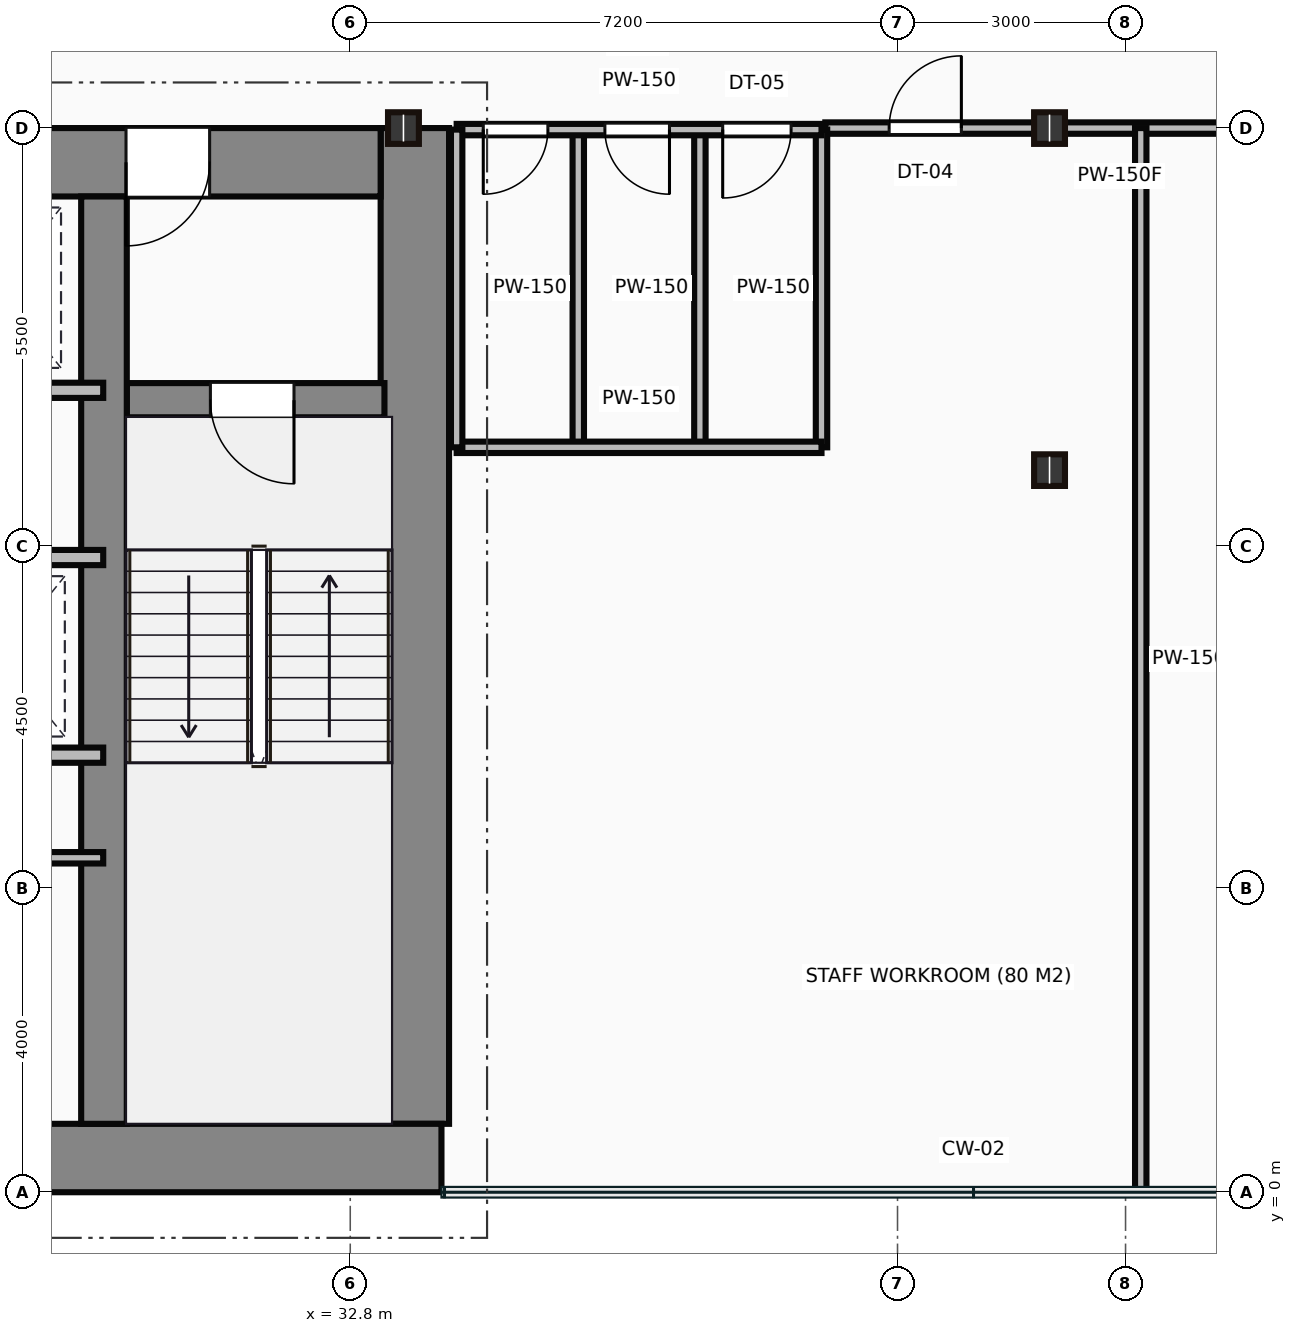
"""IFC4 building model, lengths in metres.
Left out: names, types, materials, properties, quantities, classifications, styles, units other than length and angle.
Written with IfcOpenShell. Run it as: python <this file> out.ifc"""

import sys

from ifc_helpers import new_model, si_unit, direction, frame, frame_2d, origin, origin_2d, place, context, subcontext, project, spatial, rectangle, i_section, extrude, source, transform, mapped, element, fill, save


model = new_model("IFC4")
c1 = context("Model", 3, precision=1e-05, world=origin(), true_north=direction((0.0, 1.0)))
c2 = subcontext(c1, "Body", "Model", "MODEL_VIEW")
j1 = project(units=[si_unit("LENGTHUNIT", "METRE"), si_unit("PLANEANGLEUNIT", "RADIAN")], contexts=[c1])
p1 = place(None, origin())
s1 = spatial("IfcSite", under=j1, at=p1, CompositionType="ELEMENT")
p2 = place(p1, origin())
s2 = spatial("IfcBuilding", under=s1, at=p2, CompositionType="ELEMENT")
p3 = place(p2, frame((0.0, 0.0, 58.05)))
s3 = spatial("IfcBuildingStorey", under=s2, at=p3, CompositionType="ELEMENT", Elevation=58.05)
m1 = source(origin(), c2, "Body", "SweptSolid", [
    extrude(rectangle(XDim=29.5, YDim=0.9, at=frame_2d((14.75, 0.0))), origin(), (0.0, 0.0, 1.0), 3.65),
])
p4 = place(p3, frame((4.5, 0.45, 0.0), z_axis=(0.0, 0.0, 1.0), x_axis=(1.0, 0.0, 0.0)))
e1 = element("IfcWall", 1, at=p4, inside=s3, PredefinedType="SHEAR", context=c2, shape_type="MappedRepresentation", body=[
    mapped(m1, transform((0.0, 0.0, 0.0))),
])
m2 = source(origin(), c2, "Body", "SweptSolid", [
    extrude(rectangle(XDim=13.1, YDim=0.9, at=frame_2d((6.55, 0.0))), origin(), (0.0, 0.0, 1.0), 3.65),
])
p5 = place(p3, frame((33.65, 0.9, 0.0), z_axis=(0.0, 0.0, 1.0), x_axis=(0.0, 1.0, 0.0)))
e2 = element("IfcWall", 2, at=p5, inside=s3, PredefinedType="SHEAR", context=c2, shape_type="MappedRepresentation", body=[
    mapped(m2, transform((0.0, 0.0, 0.0))),
])
m3 = source(origin(), c2, "Body", "SweptSolid", [
    extrude(rectangle(XDim=12.6, YDim=0.9, at=frame_2d((6.3, 0.0))), origin(), (0.0, 0.0, 1.0), 3.65),
])
p6 = place(p3, frame((20.6, 13.55, 0.0), z_axis=(0.0, 0.0, 1.0), x_axis=(1.0, 0.0, 0.0)))
e3 = element("IfcWall", 3, at=p6, inside=s3, PredefinedType="SHEAR", context=c2, shape_type="MappedRepresentation", body=[
    mapped(m3, transform((0.0, 0.0, 0.0))),
])
p7 = place(p6, frame((9.25, 0.0, 0.0)))
e4 = element("IfcOpeningElement", 4, at=p7, cuts=e3, PredefinedType="OPENING", context=c2, shape_type="SweptSolid", body=[
    extrude(rectangle(XDim=1.1, YDim=2.15, at=frame_2d((0.55, 1.075))), frame((0.0, 0.46, 0.0), z_axis=(0.0, -1.0, 0.0), x_axis=(1.0, 0.0, 0.0)), (0.0, 0.0, 1.0), 0.92),
])
m4 = source(origin(), c2, "Body", "SweptSolid", [
    extrude(rectangle(XDim=12.2, YDim=0.6, at=frame_2d((6.1, 0.0))), origin(), (0.0, 0.0, 1.0), 3.65),
])
p8 = place(p3, frame((29.56, 0.9, 0.0), z_axis=(0.0, 0.0, 1.0), x_axis=(0.0, 1.0, 0.0)))
e5 = element("IfcWall", 5, at=p8, inside=s3, PredefinedType="SHEAR", context=c2, shape_type="MappedRepresentation", body=[
    mapped(m4, transform((0.0, 0.0, 0.0))),
])
m5 = source(origin(), c2, "Body", "SweptSolid", [
    extrude(rectangle(XDim=3.39, YDim=0.45, at=frame_2d((1.695, 0.0))), origin(), (0.0, 0.0, 1.0), 3.65),
])
p9 = place(p3, frame((29.86, 10.42, 0.0), z_axis=(0.0, 0.0, 1.0), x_axis=(1.0, 0.0, 0.0)))
e6 = element("IfcWall", 6, at=p9, inside=s3, PredefinedType="SHEAR", context=c2, shape_type="MappedRepresentation", body=[
    mapped(m5, transform((0.0, 0.0, 0.0))),
])
p10 = place(p9, frame((1.1, 0.0, 0.0)))
e7 = element("IfcOpeningElement", 7, at=p10, cuts=e6, PredefinedType="OPENING", context=c2, shape_type="SweptSolid", body=[
    extrude(rectangle(XDim=1.1, YDim=2.15, at=frame_2d((0.55, 1.075))), frame((0.0, 0.235, 0.0), z_axis=(0.0, -1.0, 0.0), x_axis=(1.0, 0.0, 0.0)), (0.0, 0.0, 1.0), 0.47),
])
m6 = source(origin(), c2, "Body", "SweptSolid", [
    extrude(i_section(OverallWidth=0.406, OverallDepth=0.416, WebThickness=0.03, FlangeThickness=0.048, at=origin_2d()), origin(), (0.0, 0.0, 1.0), 3.65),
])
for number, where, z_axis, x_axis in (
    (8, (33.5, 14.0, 0.0), (0.0, 0.0, 1.0), (1.0, 0.0, 0.0)),
    (9, (42.0, 9.5, 0.0), (0.0, 0.0, 1.0), (1.0, 0.0, 0.0)),
    (10, (42.0, 14.0, 0.0), (0.0, 0.0, 1.0), (1.0, 0.0, 0.0)),
):
    element("IfcColumn", number, at=place(p3, frame(where, z_axis=z_axis, x_axis=x_axis)), inside=s3, PredefinedType="COLUMN", context=c2, shape_type="MappedRepresentation", body=[
        mapped(m6, transform((0.0, 0.0, 0.0))),
    ])
m7 = source(origin(), c2, "Body", "SweptSolid", [
    extrude(rectangle(XDim=8.8, YDim=0.2, at=frame_2d((4.4, 0.0))), origin(), (0.0, 0.0, 1.0), 3.4),
])
p11 = place(p3, frame((20.75, 10.55, 0.0), z_axis=(0.0, 0.0, 1.0), x_axis=(1.0, 0.0, 0.0)))
e11 = element("IfcWall", 11, at=p11, inside=s3, PredefinedType="PARTITIONING", context=c2, shape_type="MappedRepresentation", body=[
    mapped(m7, transform((0.0, 0.0, 0.0))),
])
m8 = source(origin(), c2, "Body", "SweptSolid", [
    extrude(rectangle(XDim=4.55, YDim=0.2, at=frame_2d((2.275, 0.0))), origin(), (0.0, 0.0, 1.0), 3.4),
])
for number, where, z_axis, x_axis in (
    (12, (25.0, 8.35, 0.0), (0.0, 0.0, 1.0), (1.0, 0.0, 0.0)),
    (13, (25.0, 5.75, 0.0), (0.0, 0.0, 1.0), (1.0, 0.0, 0.0)),
):
    element("IfcWall", number, at=place(p3, frame(where, z_axis=z_axis, x_axis=x_axis)), inside=s3, PredefinedType="PARTITIONING", context=c2, shape_type="MappedRepresentation", body=[
        mapped(m8, transform((0.0, 0.0, 0.0))),
    ])
m9 = source(origin(), c2, "Body", "SweptSolid", [
    extrude(rectangle(XDim=4.55, YDim=0.15, at=frame_2d((2.275, 0.0))), origin(), (0.0, 0.0, 1.0), 3.4),
])
p12 = place(p3, frame((25.0, 4.4, 0.0), z_axis=(0.0, 0.0, 1.0), x_axis=(1.0, 0.0, 0.0)))
e14 = element("IfcWall", 14, at=p12, inside=s3, PredefinedType="PARTITIONING", context=c2, shape_type="MappedRepresentation", body=[
    mapped(m9, transform((0.0, 0.0, 0.0))),
])
m10 = source(origin(), c2, "Body", "SweptSolid", [
    extrude(rectangle(XDim=4.8, YDim=0.15, at=frame_2d((2.4, 0.0))), origin(), (0.0, 0.0, 1.0), 2.625),
])
p13 = place(p3, frame((34.2, 13.98, 0.0), z_axis=(0.0, 0.0, 1.0), x_axis=(1.0, 0.0, 0.0)))
e15 = element("IfcWall", 15, at=p13, inside=s3, PredefinedType="PARTITIONING", context=c2, shape_type="MappedRepresentation", body=[
    mapped(m10, transform((0.0, 0.0, 0.0))),
])
p14 = place(p13, frame((0.35, 0.0, 0.0)))
e16 = element("IfcOpeningElement", 16, at=p14, cuts=e15, PredefinedType="OPENING", context=c2, shape_type="SweptSolid", body=[
    extrude(rectangle(XDim=0.85, YDim=2.1, at=frame_2d((0.425, 1.05))), frame((0.0, 0.085, 0.0), z_axis=(0.0, -1.0, 0.0), x_axis=(1.0, 0.0, 0.0)), (0.0, 0.0, 1.0), 0.17),
])
p15 = place(p13, frame((1.95, 0.0, 0.0)))
e17 = element("IfcOpeningElement", 17, at=p15, cuts=e15, PredefinedType="OPENING", context=c2, shape_type="SweptSolid", body=[
    extrude(rectangle(XDim=0.85, YDim=2.1, at=frame_2d((0.425, 1.05))), frame((0.0, 0.085, 0.0), z_axis=(0.0, -1.0, 0.0), x_axis=(1.0, 0.0, 0.0)), (0.0, 0.0, 1.0), 0.17),
])
p16 = place(p13, frame((3.5, 0.0, 0.0)))
e18 = element("IfcOpeningElement", 18, at=p16, cuts=e15, PredefinedType="OPENING", context=c2, shape_type="SweptSolid", body=[
    extrude(rectangle(XDim=0.9, YDim=2.1, at=frame_2d((0.45, 1.05))), frame((0.0, 0.085, 0.0), z_axis=(0.0, -1.0, 0.0), x_axis=(1.0, 0.0, 0.0)), (0.0, 0.0, 1.0), 0.17),
])
m11 = source(origin(), c2, "Body", "SweptSolid", [
    extrude(rectangle(XDim=4.8, YDim=0.15, at=frame_2d((2.4, 0.0))), origin(), (0.0, 0.0, 1.0), 3.4),
])
p17 = place(p3, frame((34.2, 9.8, 0.0), z_axis=(0.0, 0.0, 1.0), x_axis=(1.0, 0.0, 0.0)))
e19 = element("IfcWall", 19, at=p17, inside=s3, PredefinedType="PARTITIONING", context=c2, shape_type="MappedRepresentation", body=[
    mapped(m11, transform((0.0, 0.0, 0.0))),
])
m12 = source(origin(), c2, "Body", "SweptSolid", [
    extrude(rectangle(XDim=4.18, YDim=0.15, at=frame_2d((2.09, 0.0))), origin(), (0.0, 0.0, 1.0), 3.4),
])
for number, where, z_axis, x_axis in (
    (20, (39.0, 9.8, 0.0), (0.0, 0.0, 1.0), (0.0, 1.0, 0.0)),
    (21, (34.2, 9.8, 0.0), (0.0, 0.0, 1.0), (0.0, 1.0, 0.0)),
    (22, (35.8, 9.8, 0.0), (0.0, 0.0, 1.0), (0.0, 1.0, 0.0)),
    (23, (37.4, 9.8, 0.0), (0.0, 0.0, 1.0), (0.0, 1.0, 0.0)),
):
    element("IfcWall", number, at=place(p3, frame(where, z_axis=z_axis, x_axis=x_axis)), inside=s3, PredefinedType="PARTITIONING", context=c2, shape_type="MappedRepresentation", body=[
        mapped(m12, transform((0.0, 0.0, 0.0))),
    ])
m13 = source(origin(), c2, "Body", "SweptSolid", [
    extrude(rectangle(XDim=7.75, YDim=0.15, at=frame_2d((3.875, 0.0))), origin(), (0.0, 0.0, 1.0), 2.625),
])
p18 = place(p3, frame((46.8, 14.0, 0.0), z_axis=(0.0, 0.0, 1.0), x_axis=(-1.0, 0.0, 0.0)))
e24 = element("IfcWall", 24, at=p18, inside=s3, PredefinedType="PARTITIONING", context=c2, shape_type="MappedRepresentation", body=[
    mapped(m13, transform((0.0, 0.0, 0.0))),
])
p19 = place(p18, frame((5.96, 0.0, 0.0)))
e25 = element("IfcOpeningElement", 25, at=p19, cuts=e24, PredefinedType="OPENING", context=c2, shape_type="SweptSolid", body=[
    extrude(rectangle(XDim=0.95, YDim=2.15, at=frame_2d((0.475, 1.075))), frame((0.0, 0.085, 0.0), z_axis=(0.0, -1.0, 0.0), x_axis=(1.0, 0.0, 0.0)), (0.0, 0.0, 1.0), 0.17),
])
p20 = place(p18, frame((1.455, 0.0, 0.0)))
e26 = element("IfcOpeningElement", 26, at=p20, cuts=e24, PredefinedType="OPENING", context=c2, shape_type="SweptSolid", body=[
    extrude(rectangle(XDim=0.95, YDim=2.15, at=frame_2d((0.475, 1.075))), frame((0.0, 0.085, 0.0), z_axis=(0.0, -1.0, 0.0), x_axis=(1.0, 0.0, 0.0)), (0.0, 0.0, 1.0), 0.17),
])
m14 = source(origin(), c2, "Body", "SweptSolid", [
    extrude(rectangle(XDim=13.98, YDim=0.15, at=frame_2d((6.99, 0.0))), origin(), (0.0, 0.0, 1.0), 3.4),
])
p21 = place(p3, frame((43.2, 14.0, 0.0), z_axis=(0.0, 0.0, 1.0), x_axis=(0.0, -1.0, 0.0)))
e27 = element("IfcWall", 27, at=p21, inside=s3, PredefinedType="PARTITIONING", context=c2, shape_type="MappedRepresentation", body=[
    mapped(m14, transform((0.0, 0.0, 0.0))),
])
m15 = source(origin(), c2, "Body", "SweptSolid", [
    extrude(rectangle(XDim=1.1, YDim=2.15, at=frame_2d((0.55, 1.075))), frame((0.0, 0.025, 0.0), z_axis=(0.0, -1.0, 0.0), x_axis=(1.0, 0.0, 0.0)), (0.0, 0.0, 1.0), 0.05),
])
p22 = place(p10, frame((1.1, 0.0, 0.0), z_axis=(0.0, 0.0, 1.0), x_axis=(-1.0, 0.0, 0.0)))
e28 = element("IfcDoor", 28, at=p22, inside=s3, OperationType="SINGLE_SWING_RIGHT", PredefinedType="DOOR", context=c2, shape_type="MappedRepresentation", body=[
    mapped(m15, transform((0.0, 0.0, 0.0))),
])
fill(e7, e28)
p23 = place(p7, origin())
e29 = element("IfcDoor", 29, at=p23, inside=s3, OperationType="SINGLE_SWING_LEFT", PredefinedType="DOOR", context=c2, shape_type="MappedRepresentation", body=[
    mapped(m15, transform((0.0, 0.0, 0.0))),
])
fill(e4, e29)
m16 = source(origin(), c2, "Body", "SweptSolid", [
    extrude(rectangle(XDim=0.85, YDim=2.1, at=frame_2d((0.425, 1.05))), frame((0.0, 0.025, 0.0), z_axis=(0.0, -1.0, 0.0), x_axis=(1.0, 0.0, 0.0)), (0.0, 0.0, 1.0), 0.05),
])
p24 = place(p14, frame((0.85, 0.0, 0.0), z_axis=(0.0, 0.0, 1.0), x_axis=(-1.0, 0.0, 0.0)))
e30 = element("IfcDoor", 30, at=p24, inside=s3, OperationType="SINGLE_SWING_LEFT", PredefinedType="DOOR", context=c2, shape_type="MappedRepresentation", body=[
    mapped(m16, transform((0.0, 0.0, 0.0))),
])
fill(e16, e30)
p25 = place(p15, frame((0.85, 0.0, 0.0), z_axis=(0.0, 0.0, 1.0), x_axis=(-1.0, 0.0, 0.0)))
e31 = element("IfcDoor", 31, at=p25, inside=s3, OperationType="SINGLE_SWING_RIGHT", PredefinedType="DOOR", context=c2, shape_type="MappedRepresentation", body=[
    mapped(m16, transform((0.0, 0.0, 0.0))),
])
fill(e17, e31)
m17 = source(origin(), c2, "Body", "SweptSolid", [
    extrude(rectangle(XDim=0.9, YDim=2.1, at=frame_2d((0.45, 1.05))), frame((0.0, 0.025, 0.0), z_axis=(0.0, -1.0, 0.0), x_axis=(1.0, 0.0, 0.0)), (0.0, 0.0, 1.0), 0.05),
])
p26 = place(p16, frame((0.9, 0.0, 0.0), z_axis=(0.0, 0.0, 1.0), x_axis=(-1.0, 0.0, 0.0)))
e32 = element("IfcDoor", 32, at=p26, inside=s3, OperationType="SINGLE_SWING_LEFT", PredefinedType="DOOR", context=c2, shape_type="MappedRepresentation", body=[
    mapped(m17, transform((0.0, 0.0, 0.0))),
])
fill(e18, e32)
m18 = source(origin(), c2, "Body", "SweptSolid", [
    extrude(rectangle(XDim=0.95, YDim=2.15, at=frame_2d((0.475, 1.075))), frame((0.0, 0.025, 0.0), z_axis=(0.0, -1.0, 0.0), x_axis=(1.0, 0.0, 0.0)), (0.0, 0.0, 1.0), 0.05),
])
p27 = place(p19, origin())
e33 = element("IfcDoor", 33, at=p27, inside=s3, OperationType="SINGLE_SWING_LEFT", PredefinedType="DOOR", context=c2, shape_type="MappedRepresentation", body=[
    mapped(m18, transform((0.0, 0.0, 0.0))),
])
fill(e25, e33)
save(model, sys.argv[1])
